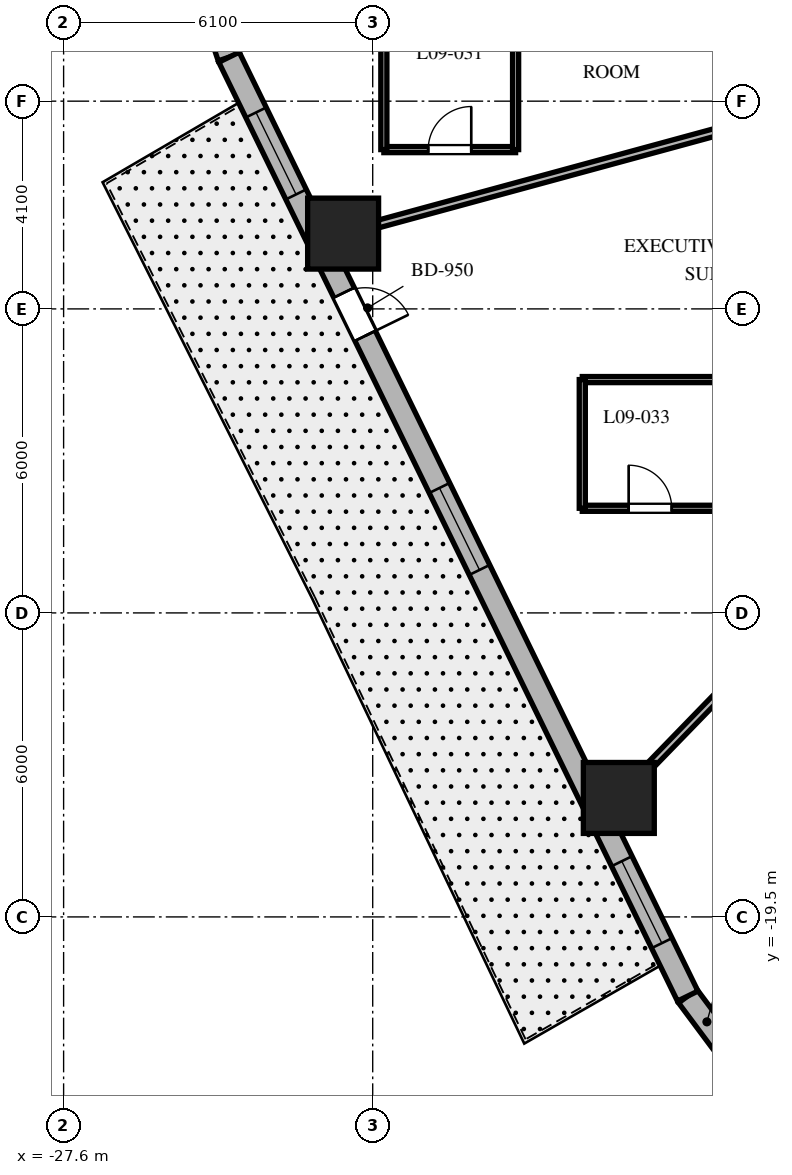
"""IFC4 building model, lengths in metres.
Left out: names, types, materials, properties, quantities, classifications, styles, units other than length and angle.
Written with IfcOpenShell. Run it as: python <this file> out.ifc"""

import sys

from ifc_helpers import new_model, si_unit, direction, frame, frame_2d, origin, origin_2d, place, context, subcontext, project, spatial, rectangle, extrude, element, fill, save


model = new_model("IFC4")
c1 = context("Model", 3, precision=1e-05, world=origin(), true_north=direction((0.0, 1.0)))
c2 = subcontext(c1, "Body", "Model", "MODEL_VIEW")
j1 = project(units=[si_unit("LENGTHUNIT", "METRE"), si_unit("PLANEANGLEUNIT", "RADIAN")], contexts=[c1])
p1 = place(None, origin())
s1 = spatial("IfcSite", under=j1, at=p1, CompositionType="ELEMENT")
p2 = place(p1, origin())
s2 = spatial("IfcBuilding", under=s1, at=p2, CompositionType="ELEMENT")
p3 = place(p2, frame((0.0, 0.0, 45.3)))
s3 = spatial("IfcBuildingStorey", under=s2, at=p3, CompositionType="ELEMENT", Elevation=45.3)
for number, where, z_axis, x_axis in (
    (1, (-22.084, -6.014, 0.0), (0.0, 0.0, 1.0), (1.0, 0.0, 0.0)),
    (2, (-16.643, -17.152, 0.0), (0.0, 0.0, 1.0), (1.0, 0.0, 0.0)),
):
    element("IfcColumn", number, at=place(p3, frame(where, z_axis=z_axis, x_axis=x_axis)), inside=s3, PredefinedType="COLUMN", context=c2, shape_type="SweptSolid", body=[
        extrude(rectangle(XDim=1.4, YDim=1.4, at=origin_2d()), origin(), (0.0, 0.0, 1.0), 3.7),
    ])
p4 = place(p3, frame((-15.284, -21.062, 0.0), z_axis=(0.0, 0.0, 1.0), x_axis=(0.597595366449, -0.801797841104, 0.0)))
e3 = element("IfcWall", 3, at=p4, inside=s3, PredefinedType="SOLIDWALL", context=c2, shape_type="SweptSolid", body=[
    extrude(rectangle(XDim=1.269, YDim=0.45, at=frame_2d((0.634, 0.0))), origin(), (0.0, 0.0, 1.0), 3.4),
])
p5 = place(p3, frame((-24.621, -1.682, 0.0), z_axis=(0.0, 0.0, 1.0), x_axis=(0.317697451681, -0.948192137278, 0.0)))
e4 = element("IfcWall", 4, at=p5, inside=s3, PredefinedType="SOLIDWALL", context=c2, shape_type="SweptSolid", body=[
    extrude(rectangle(XDim=0.897, YDim=0.45, at=frame_2d((0.448, 0.0))), origin(), (0.0, 0.0, 1.0), 3.4),
])
p6 = place(p3, frame((-24.336, -2.532, 0.0), z_axis=(0.0, 0.0, 1.0), x_axis=(0.438931326393, -0.898520612291, 0.0)))
e5 = element("IfcWall", 5, at=p6, inside=s3, PredefinedType="SOLIDWALL", context=c2, shape_type="SweptSolid", body=[
    extrude(rectangle(XDim=20.623, YDim=0.45, at=frame_2d((10.312, 0.0))), origin(), (0.0, 0.0, 1.0), 3.4),
])
p7 = place(p6, frame((5.171, 0.0, 0.0)))
e6 = element("IfcOpeningElement", 6, at=p7, cuts=e5, PredefinedType="OPENING", context=c2, shape_type="SweptSolid", body=[
    extrude(rectangle(XDim=0.95, YDim=2.15, at=frame_2d((0.475, 1.075))), frame((0.0, 0.235, 0.0), z_axis=(0.0, -1.0, 0.0), x_axis=(1.0, 0.0, 0.0)), (0.0, 0.0, 1.0), 0.47),
])
p8 = place(p6, frame((1.214, 0.0, 0.8)))
e7 = element("IfcOpeningElement", 7, at=p8, cuts=e5, PredefinedType="OPENING", context=c2, shape_type="SweptSolid", body=[
    extrude(rectangle(XDim=1.8, YDim=1.8, at=frame_2d((0.9, 0.9))), frame((0.0, 0.235, 0.0), z_axis=(0.0, -1.0, 0.0), x_axis=(1.0, 0.0, 0.0)), (0.0, 0.0, 1.0), 0.47),
])
p9 = place(p6, frame((9.462, 0.0, 0.8)))
e8 = element("IfcOpeningElement", 8, at=p9, cuts=e5, PredefinedType="OPENING", context=c2, shape_type="SweptSolid", body=[
    extrude(rectangle(XDim=1.8, YDim=1.8, at=frame_2d((0.9, 0.9))), frame((0.0, 0.235, 0.0), z_axis=(0.0, -1.0, 0.0), x_axis=(1.0, 0.0, 0.0)), (0.0, 0.0, 1.0), 0.47),
])
p10 = place(p6, frame((17.66, 0.0, 0.8)))
e9 = element("IfcOpeningElement", 9, at=p10, cuts=e5, PredefinedType="OPENING", context=c2, shape_type="SweptSolid", body=[
    extrude(rectangle(XDim=1.8, YDim=1.8, at=frame_2d((0.9, 0.9))), frame((0.0, 0.235, 0.0), z_axis=(0.0, -1.0, 0.0), x_axis=(1.0, 0.0, 0.0)), (0.0, 0.0, 1.0), 0.47),
])
p11 = place(p3, frame((-11.35, -3.091, 0.0), z_axis=(0.0, 0.0, 1.0), x_axis=(-0.964859685283, -0.262765651704, 0.0)))
e10 = element("IfcWall", 10, at=p11, inside=s3, PredefinedType="PARTITIONING", context=c2, shape_type="SweptSolid", body=[
    extrude(rectangle(XDim=11.629, YDim=0.15, at=frame_2d((5.814, 0.0))), origin(), (0.0, 0.0, 1.0), 2.54),
])
p12 = place(p3, frame((-9.558, -9.85, 0.0), z_axis=(0.0, 0.0, 1.0), x_axis=(-0.69638346089, -0.717669893056, 0.0)))
e11 = element("IfcWall", 11, at=p12, inside=s3, PredefinedType="PARTITIONING", context=c2, shape_type="SweptSolid", body=[
    extrude(rectangle(XDim=10.701, YDim=0.15, at=frame_2d((5.351, 0.0))), origin(), (0.0, 0.0, 1.0), 2.54),
])
p13 = place(p3, frame((-21.28, -4.356, 0.0), z_axis=(0.0, 0.0, 1.0), x_axis=(1.0, 0.0, 0.0)))
e12 = element("IfcWall", 12, at=p13, inside=s3, PredefinedType="PARTITIONING", context=c2, shape_type="SweptSolid", body=[
    extrude(rectangle(XDim=2.6, YDim=0.12, at=frame_2d((1.3, 0.0))), origin(), (0.0, 0.0, 1.0), 3.4),
])
p14 = place(p13, frame((0.875, 0.0, 0.0)))
e13 = element("IfcOpeningElement", 13, at=p14, cuts=e12, PredefinedType="OPENING", context=c2, shape_type="SweptSolid", body=[
    extrude(rectangle(XDim=0.85, YDim=2.03, at=frame_2d((0.425, 1.015))), frame((0.0, 0.07, 0.0), z_axis=(0.0, -1.0, 0.0), x_axis=(1.0, 0.0, 0.0)), (0.0, 0.0, 1.0), 0.14),
])
for number, where, z_axis, x_axis in (
    (14, (-18.68, -4.356, 0.0), (0.0, 0.0, 1.0), (0.0, 1.0, 0.0)),
    (15, (-21.28, -1.606, 0.0), (0.0, 0.0, 1.0), (0.0, -1.0, 0.0)),
):
    element("IfcWall", number, at=place(p3, frame(where, z_axis=z_axis, x_axis=x_axis)), inside=s3, PredefinedType="PARTITIONING", context=c2, shape_type="SweptSolid", body=[
        extrude(rectangle(XDim=2.75, YDim=0.12, at=frame_2d((1.375, 0.0))), origin(), (0.0, 0.0, 1.0), 3.4),
    ])
p15 = place(p3, frame((-17.364, -11.435, 0.0), z_axis=(0.0, 0.0, 1.0), x_axis=(1.0, 0.0, 0.0)))
e16 = element("IfcWall", 16, at=p15, inside=s3, PredefinedType="PARTITIONING", context=c2, shape_type="SweptSolid", body=[
    extrude(rectangle(XDim=2.68, YDim=0.12, at=frame_2d((1.34, 0.0))), origin(), (0.0, 0.0, 1.0), 2.927),
])
p16 = place(p15, frame((0.915, 0.0, 0.0)))
e17 = element("IfcOpeningElement", 17, at=p16, cuts=e16, PredefinedType="OPENING", context=c2, shape_type="SweptSolid", body=[
    extrude(rectangle(XDim=0.85, YDim=2.03, at=frame_2d((0.425, 1.015))), frame((0.0, 0.07, 0.0), z_axis=(0.0, -1.0, 0.0), x_axis=(1.0, 0.0, 0.0)), (0.0, 0.0, 1.0), 0.14),
])
p17 = place(p3, frame((-14.684, -8.895, 0.0), z_axis=(0.0, 0.0, 1.0), x_axis=(-1.0, 0.0, 0.0)))
e18 = element("IfcWall", 18, at=p17, inside=s3, PredefinedType="PARTITIONING", context=c2, shape_type="SweptSolid", body=[
    extrude(rectangle(XDim=2.68, YDim=0.12, at=frame_2d((1.34, 0.0))), origin(), (0.0, 0.0, 1.0), 2.927),
])
p18 = place(p3, frame((-17.364, -8.895, 0.0), z_axis=(0.0, 0.0, 1.0), x_axis=(0.0, -1.0, 0.0)))
e19 = element("IfcWall", 19, at=p18, inside=s3, PredefinedType="PARTITIONING", context=c2, shape_type="SweptSolid", body=[
    extrude(rectangle(XDim=2.54, YDim=0.12, at=frame_2d((1.27, 0.0))), origin(), (0.0, 0.0, 1.0), 3.4),
])
p19 = place(p7, origin())
e20 = element("IfcDoor", 20, at=p19, inside=s3, OperationType="SINGLE_SWING_RIGHT", PredefinedType="DOOR", context=c2, shape_type="SweptSolid", body=[
    extrude(rectangle(XDim=0.95, YDim=2.15, at=frame_2d((0.475, 1.075))), frame((0.0, 0.025, 0.0), z_axis=(0.0, -1.0, 0.0), x_axis=(1.0, 0.0, 0.0)), (0.0, 0.0, 1.0), 0.05),
])
fill(e6, e20)
p20 = place(p8, origin())
e21 = element("IfcWindow", 21, at=p20, inside=s3, PartitioningType="SINGLE_PANEL", PredefinedType="WINDOW", context=c2, shape_type="SweptSolid", body=[
    extrude(rectangle(XDim=1.8, YDim=1.8, at=frame_2d((0.9, 0.9))), frame((0.0, 0.03, 0.0), z_axis=(0.0, -1.0, 0.0), x_axis=(1.0, 0.0, 0.0)), (0.0, 0.0, 1.0), 0.06),
])
fill(e7, e21)
p21 = place(p9, origin())
e22 = element("IfcWindow", 22, at=p21, inside=s3, PartitioningType="SINGLE_PANEL", PredefinedType="WINDOW", context=c2, shape_type="SweptSolid", body=[
    extrude(rectangle(XDim=1.8, YDim=1.8, at=frame_2d((0.9, 0.9))), frame((0.0, 0.03, 0.0), z_axis=(0.0, -1.0, 0.0), x_axis=(1.0, 0.0, 0.0)), (0.0, 0.0, 1.0), 0.06),
])
fill(e8, e22)
p22 = place(p10, origin())
e23 = element("IfcWindow", 23, at=p22, inside=s3, PartitioningType="SINGLE_PANEL", PredefinedType="WINDOW", context=c2, shape_type="SweptSolid", body=[
    extrude(rectangle(XDim=1.8, YDim=1.8, at=frame_2d((0.9, 0.9))), frame((0.0, 0.03, 0.0), z_axis=(0.0, -1.0, 0.0), x_axis=(1.0, 0.0, 0.0)), (0.0, 0.0, 1.0), 0.06),
])
fill(e9, e23)
p23 = place(p14, origin())
e24 = element("IfcDoor", 24, at=p23, inside=s3, OperationType="SINGLE_SWING_RIGHT", PredefinedType="DOOR", context=c2, shape_type="SweptSolid", body=[
    extrude(rectangle(XDim=0.85, YDim=2.03, at=frame_2d((0.425, 1.015))), frame((0.0, 0.025, 0.0), z_axis=(0.0, -1.0, 0.0), x_axis=(1.0, 0.0, 0.0)), (0.0, 0.0, 1.0), 0.05),
])
fill(e13, e24)
p24 = place(p16, origin())
e25 = element("IfcDoor", 25, at=p24, inside=s3, OperationType="SINGLE_SWING_LEFT", PredefinedType="DOOR", context=c2, shape_type="SweptSolid", body=[
    extrude(rectangle(XDim=0.85, YDim=2.03, at=frame_2d((0.425, 1.015))), frame((0.0, 0.025, 0.0), z_axis=(0.0, -1.0, 0.0), x_axis=(1.0, 0.0, 0.0)), (0.0, 0.0, 1.0), 0.05),
])
fill(e17, e25)
save(model, sys.argv[1])
